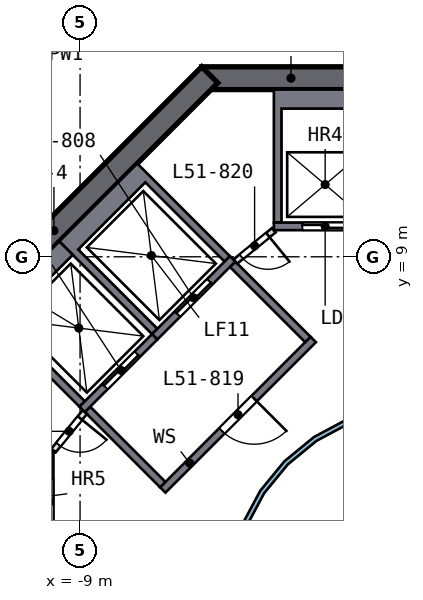
"""IFC4 building model, lengths in metres.
Left out: names, types, materials, properties, quantities, classifications, styles, units other than length and angle.
Written with IfcOpenShell. Run it as: python <this file> out.ifc"""

import sys

from ifc_helpers import new_model, si_unit, direction, frame, frame_2d, origin, place, context, subcontext, project, spatial, polyline, rectangle, outline, extrude, element, fill, save


model = new_model("IFC4")
c1 = context("Model", 3, precision=1e-05, world=origin(), true_north=direction((0.0, 1.0)))
c2 = subcontext(c1, "Body", "Model", "MODEL_VIEW")
j1 = project(units=[si_unit("LENGTHUNIT", "METRE"), si_unit("PLANEANGLEUNIT", "RADIAN")], contexts=[c1])
p1 = place(None, origin())
s1 = spatial("IfcSite", under=j1, at=p1, CompositionType="ELEMENT")
p2 = place(p1, origin())
s2 = spatial("IfcBuilding", under=s1, at=p2, CompositionType="ELEMENT")
p3 = place(p2, frame((0.0, 0.0, 209.0)))
s3 = spatial("IfcBuildingStorey", under=s2, at=p3, CompositionType="ELEMENT", Elevation=209.0)
p4 = place(p3, frame((5.799, 13.7, 0.0), z_axis=(0.0, 0.0, 1.0), x_axis=(-1.0, 0.0, 0.0)))
e1 = element("IfcWall", 1, at=p4, inside=s3, PredefinedType="SHEAR", context=c2, shape_type="SweptSolid", body=[
    extrude(rectangle(XDim=11.598, YDim=0.6, at=frame_2d((5.799, 0.0))), origin(), (0.0, 0.0, 1.0), 3.5),
])
p5 = place(p4, frame((4.899, 0.0, 0.0)))
e2 = element("IfcOpeningElement", 2, at=p5, cuts=e1, PredefinedType="OPENING", context=c2, shape_type="SweptSolid", body=[
    extrude(rectangle(XDim=1.8, YDim=2.1, at=frame_2d((0.9, 1.05))), frame((0.0, 0.31, 0.0), z_axis=(0.0, -1.0, 0.0), x_axis=(1.0, 0.0, 0.0)), (0.0, 0.0, 1.0), 0.62),
])
p6 = place(p3, frame((-5.587, 13.788, 0.0), z_axis=(0.0, 0.0, 1.0), x_axis=(-0.707106781, -0.707106781, 0.0)))
e3 = element("IfcWall", 3, at=p6, inside=s3, PredefinedType="SHEAR", context=c2, shape_type="SweptSolid", body=[
    extrude(rectangle(XDim=11.598, YDim=0.6, at=frame_2d((5.799, 0.0))), origin(), (0.0, 0.0, 1.0), 3.5),
])
p7 = place(p3, origin())
e4 = element("IfcWall", 4, at=p7, inside=s3, PredefinedType="SOLIDWALL", context=c2, shape_type="SweptSolid", body=[
    extrude(outline(polyline([(-3.9, 13.4), (-1.2, 13.4), (-1.2, 9.9), (-1.4, 9.9), (-1.4, 12.9), (-3.7, 12.9), (-3.7, 9.9), (-3.9, 9.9), (-3.9, 13.4)])), origin(), (0.0, 0.0, 1.0), 3.19),
])
p8 = place(p3, frame((-1.2, 9.8, 0.0), z_axis=(0.0, 0.0, 1.0), x_axis=(-1.0, 0.0, 0.0)))
e5 = element("IfcWall", 5, at=p8, inside=s3, PredefinedType="SOLIDWALL", context=c2, shape_type="SweptSolid", body=[
    extrude(rectangle(XDim=2.7, YDim=0.2, at=frame_2d((1.35, 0.0))), origin(), (0.0, 0.0, 1.0), 3.19),
])
p9 = place(p8, frame((0.75, 0.0, 0.0)))
e6 = element("IfcOpeningElement", 6, at=p9, cuts=e5, PredefinedType="OPENING", context=c2, shape_type="SweptSolid", body=[
    extrude(rectangle(XDim=1.2, YDim=2.1, at=frame_2d((0.6, 1.05))), frame((0.0, 0.11, 0.0), z_axis=(0.0, -1.0, 0.0), x_axis=(1.0, 0.0, 0.0)), (0.0, 0.0, 1.0), 0.22),
])
p10 = place(p3, frame((-9.8, 1.2, 0.0), z_axis=(0.0, 0.0, 1.0), x_axis=(0.0, 1.0, 0.0)))
e7 = element("IfcWall", 7, at=p10, inside=s3, PredefinedType="SOLIDWALL", context=c2, shape_type="SweptSolid", body=[
    extrude(rectangle(XDim=2.7, YDim=0.2, at=frame_2d((1.35, 0.0))), origin(), (0.0, 0.0, 1.0), 3.19),
])
p11 = place(p10, frame((0.75, 0.0, 0.0)))
e8 = element("IfcOpeningElement", 8, at=p11, cuts=e7, PredefinedType="OPENING", context=c2, shape_type="SweptSolid", body=[
    extrude(rectangle(XDim=1.2, YDim=2.1, at=frame_2d((0.6, 1.05))), frame((0.0, 0.11, 0.0), z_axis=(0.0, -1.0, 0.0), x_axis=(1.0, 0.0, 0.0)), (0.0, 0.0, 1.0), 0.22),
])
p12 = place(p3, origin())
e9 = element("IfcWall", 9, at=p12, inside=s3, PredefinedType="SOLIDWALL", context=c2, shape_type="SweptSolid", body=[
    extrude(outline(polyline([(-9.546, 9.405), (-7.495, 11.455), (-5.056, 9.016), (-5.197, 8.874), (-7.283, 10.96), (-9.051, 9.192), (-6.965, 7.106), (-7.106, 6.965), (-9.546, 9.405)])), origin(), (0.0, 0.0, 1.0), 3.19),
])
p13 = place(p3, frame((-4.985, 8.945, 0.0), z_axis=(0.0, 0.0, 1.0), x_axis=(-0.707106781, -0.707106781, 0.0)))
e10 = element("IfcWall", 10, at=p13, inside=s3, PredefinedType="SOLIDWALL", context=c2, shape_type="SweptSolid", body=[
    extrude(rectangle(XDim=2.9, YDim=0.2, at=frame_2d((1.45, 0.0))), origin(), (0.0, 0.0, 1.0), 3.19),
])
p14 = place(p13, frame((0.85, 0.0, 0.0)))
e11 = element("IfcOpeningElement", 11, at=p14, cuts=e10, PredefinedType="OPENING", context=c2, shape_type="SweptSolid", body=[
    extrude(rectangle(XDim=1.2, YDim=2.1, at=frame_2d((0.6, 1.05))), frame((0.0, 0.11, 0.0), z_axis=(0.0, -1.0, 0.0), x_axis=(1.0, 0.0, 0.0)), (0.0, 0.0, 1.0), 0.22),
])
p15 = place(p3, origin())
e12 = element("IfcWall", 12, at=p15, inside=s3, PredefinedType="SOLIDWALL", context=c2, shape_type="SweptSolid", body=[
    extrude(outline(polyline([(-11.455, 7.495), (-9.546, 9.405), (-9.192, 9.051), (-10.96, 7.283), (-8.874, 5.197), (-9.016, 5.056), (-11.455, 7.495)])), origin(), (0.0, 0.0, 1.0), 3.19),
])
p16 = place(p3, frame((-7.036, 6.894, 0.0), z_axis=(0.0, 0.0, 1.0), x_axis=(-0.707106781, -0.707106781, 0.0)))
e13 = element("IfcWall", 13, at=p16, inside=s3, PredefinedType="SOLIDWALL", context=c2, shape_type="SweptSolid", body=[
    extrude(rectangle(XDim=2.7, YDim=0.2, at=frame_2d((1.35, 0.0))), origin(), (0.0, 0.0, 1.0), 3.19),
])
p17 = place(p16, frame((0.65, 0.0, 0.0)))
e14 = element("IfcOpeningElement", 14, at=p17, cuts=e13, PredefinedType="OPENING", context=c2, shape_type="SweptSolid", body=[
    extrude(rectangle(XDim=1.2, YDim=2.1, at=frame_2d((0.6, 1.05))), frame((0.0, 0.11, 0.0), z_axis=(0.0, -1.0, 0.0), x_axis=(1.0, 0.0, 0.0)), (0.0, 0.0, 1.0), 0.22),
])
p18 = place(p3, frame((-2.864, 6.823, 0.0), z_axis=(0.0, 0.0, 1.0), x_axis=(-0.707106781, -0.707106781, 0.0)))
e15 = element("IfcWall", 15, at=p18, inside=s3, PredefinedType="SOLIDWALL", context=c2, shape_type="SweptSolid", body=[
    extrude(rectangle(XDim=5.6, YDim=0.2, at=frame_2d((2.8, 0.0))), origin(), (0.0, 0.0, 1.0), 3.19),
])
p19 = place(p18, frame((2.2, 0.0, 0.0)))
e16 = element("IfcOpeningElement", 16, at=p19, cuts=e15, PredefinedType="OPENING", context=c2, shape_type="SweptSolid", body=[
    extrude(rectangle(XDim=1.2, YDim=2.1, at=frame_2d((0.6, 1.05))), frame((0.0, 0.11, 0.0), z_axis=(0.0, -1.0, 0.0), x_axis=(1.0, 0.0, 0.0)), (0.0, 0.0, 1.0), 0.22),
])
for number, where, z_axis, x_axis in (
    (17, (-3.005, 6.823, 0.0), (0.0, 0.0, 1.0), (-0.707, 0.707, 0.0)),
    (18, (-6.823, 3.005, 0.0), (0.0, 0.0, 1.0), (-0.707, 0.707, 0.0)),
):
    element("IfcWall", number, at=place(p3, frame(where, z_axis=z_axis, x_axis=x_axis)), inside=s3, PredefinedType="SOLIDWALL", context=c2, shape_type="SweptSolid", body=[
        extrude(rectangle(XDim=2.8, YDim=0.2, at=frame_2d((1.4, 0.0))), origin(), (0.0, 0.0, 1.0), 3.19),
    ])
p20 = place(p3, frame((-3.9, 9.7, 0.0), z_axis=(0.0, 0.0, 1.0), x_axis=(-0.775559878, -0.631274009, 0.0)))
e19 = element("IfcWall", 19, at=p20, inside=s3, PredefinedType="PARTITIONING", context=c2, shape_type="SweptSolid", body=[
    extrude(rectangle(XDim=1.308, YDim=0.15, at=frame_2d((0.654, 0.0))), origin(), (0.0, 0.0, 1.0), 3.19),
])
p21 = place(p20, frame((0.204, 0.0, 0.0)))
e20 = element("IfcOpeningElement", 20, at=p21, cuts=e19, PredefinedType="OPENING", context=c2, shape_type="SweptSolid", body=[
    extrude(rectangle(XDim=0.9, YDim=2.1, at=frame_2d((0.45, 1.05))), frame((0.0, 0.085, 0.0), z_axis=(0.0, -1.0, 0.0), x_axis=(1.0, 0.0, 0.0)), (0.0, 0.0, 1.0), 0.17),
])
p22 = place(p3, frame((-8.874, 4.914, 0.0), z_axis=(0.0, 0.0, 1.0), x_axis=(-0.631274009, -0.775559878, 0.0)))
e21 = element("IfcWall", 21, at=p22, inside=s3, PredefinedType="PARTITIONING", context=c2, shape_type="SweptSolid", body=[
    extrude(rectangle(XDim=1.308, YDim=0.15, at=frame_2d((0.654, 0.0))), origin(), (0.0, 0.0, 1.0), 3.19),
])
p23 = place(p22, frame((0.204, 0.0, 0.0)))
e22 = element("IfcOpeningElement", 22, at=p23, cuts=e21, PredefinedType="OPENING", context=c2, shape_type="SweptSolid", body=[
    extrude(rectangle(XDim=0.9, YDim=2.1, at=frame_2d((0.45, 1.05))), frame((0.0, 0.085, 0.0), z_axis=(0.0, -1.0, 0.0), x_axis=(1.0, 0.0, 0.0)), (0.0, 0.0, 1.0), 0.17),
])
p24 = place(p3, origin())
e23 = element("IfcWall", 23, at=p24, inside=s3, PredefinedType="SOLIDWALL", context=c2, shape_type="SweptSolid", body=[
    extrude(outline(polyline([(5.021, -0.999), (4.73, -1.959), (4.257, -2.844), (3.62, -3.62), (2.844, -4.257), (1.959, -4.73), (0.999, -5.021), (0.0, -5.12), (-0.999, -5.021), (-1.959, -4.73), (-2.844, -4.257), (-3.62, -3.62), (-4.257, -2.844), (-4.73, -1.959), (-5.021, -0.999), (-5.12, 0.0), (-5.021, 0.999), (-4.73, 1.959), (-4.257, 2.844), (-3.62, 3.62), (-2.844, 4.257), (-1.959, 4.73), (-0.999, 5.021), (0.0, 5.12), (0.999, 5.021), (1.959, 4.73), (2.844, 4.257), (3.62, 3.62), (4.257, 2.844), (4.73, 1.959), (5.021, 0.999), (5.12, 0.0), (5.021, -0.999)]), holes=[polyline([(4.904, 0.976), (4.619, 1.913), (4.157, 2.778), (3.535, 3.535), (2.778, 4.157), (1.913, 4.619), (0.976, 4.904), (0.0, 5.0), (-0.976, 4.904), (-1.913, 4.619), (-2.778, 4.157), (-3.535, 3.535), (-4.157, 2.778), (-4.619, 1.913), (-4.904, 0.976), (-5.0, 0.0), (-4.904, -0.976), (-4.619, -1.913), (-4.157, -2.778), (-3.535, -3.535), (-2.778, -4.157), (-1.913, -4.619), (-0.976, -4.904), (0.0, -5.0), (0.976, -4.904), (1.913, -4.619), (2.778, -4.157), (3.535, -3.535), (4.157, -2.778), (4.619, -1.913), (4.904, -0.976), (5.0, 0.0), (4.904, 0.976)])]), origin(), (0.0, 0.0, 1.0), 3.19),
])
p25 = place(p3, frame((-8.688, 16.203, 0.0), z_axis=(0.0, 0.0, 1.0), x_axis=(-0.728947972, -0.684569101, 0.0)))
e24 = element("IfcWall", 24, at=p25, inside=s3, PredefinedType="SOLIDWALL", context=c2, shape_type="SweptSolid", body=[
    extrude(rectangle(XDim=3.658, YDim=0.2, at=frame_2d((1.829, 0.0))), origin(), (0.0, 0.0, 1.0), 3.19),
])
p26 = place(p9, origin())
e25 = element("IfcDoor", 25, at=p26, inside=s3, OperationType="DOUBLE_DOOR_SLIDING", PredefinedType="DOOR", context=c2, shape_type="SweptSolid", body=[
    extrude(rectangle(XDim=1.2, YDim=2.1, at=frame_2d((0.6, 1.05))), frame((0.0, 0.025, 0.0), z_axis=(0.0, -1.0, 0.0), x_axis=(1.0, 0.0, 0.0)), (0.0, 0.0, 1.0), 0.05),
])
fill(e6, e25)
p27 = place(p14, origin())
e26 = element("IfcDoor", 26, at=p27, inside=s3, OperationType="DOUBLE_DOOR_SLIDING", PredefinedType="DOOR", context=c2, shape_type="SweptSolid", body=[
    extrude(rectangle(XDim=1.2, YDim=2.1, at=frame_2d((0.6, 1.05))), frame((0.0, 0.025, 0.0), z_axis=(0.0, -1.0, 0.0), x_axis=(1.0, 0.0, 0.0)), (0.0, 0.0, 1.0), 0.05),
])
fill(e11, e26)
p28 = place(p17, origin())
e27 = element("IfcDoor", 27, at=p28, inside=s3, OperationType="DOUBLE_DOOR_SLIDING", PredefinedType="DOOR", context=c2, shape_type="SweptSolid", body=[
    extrude(rectangle(XDim=1.2, YDim=2.1, at=frame_2d((0.6, 1.05))), frame((0.0, 0.025, 0.0), z_axis=(0.0, -1.0, 0.0), x_axis=(1.0, 0.0, 0.0)), (0.0, 0.0, 1.0), 0.05),
])
fill(e14, e27)
p29 = place(p19, origin())
e28 = element("IfcDoor", 28, at=p29, inside=s3, OperationType="SINGLE_SWING_LEFT", PredefinedType="DOOR", context=c2, shape_type="SweptSolid", body=[
    extrude(rectangle(XDim=1.2, YDim=2.1, at=frame_2d((0.6, 1.05))), frame((0.0, 0.025, 0.0), z_axis=(0.0, -1.0, 0.0), x_axis=(1.0, 0.0, 0.0)), (0.0, 0.0, 1.0), 0.05),
])
fill(e16, e28)
p30 = place(p21, origin())
e29 = element("IfcDoor", 29, at=p30, inside=s3, OperationType="SINGLE_SWING_LEFT", PredefinedType="DOOR", context=c2, shape_type="SweptSolid", body=[
    extrude(rectangle(XDim=0.9, YDim=2.1, at=frame_2d((0.45, 1.05))), frame((0.0, 0.025, 0.0), z_axis=(0.0, -1.0, 0.0), x_axis=(1.0, 0.0, 0.0)), (0.0, 0.0, 1.0), 0.05),
])
fill(e20, e29)
p31 = place(p23, origin())
e30 = element("IfcDoor", 30, at=p31, inside=s3, OperationType="SINGLE_SWING_LEFT", PredefinedType="DOOR", context=c2, shape_type="SweptSolid", body=[
    extrude(rectangle(XDim=0.9, YDim=2.1, at=frame_2d((0.45, 1.05))), frame((0.0, 0.025, 0.0), z_axis=(0.0, -1.0, 0.0), x_axis=(1.0, 0.0, 0.0)), (0.0, 0.0, 1.0), 0.05),
])
fill(e22, e30)
save(model, sys.argv[1])
